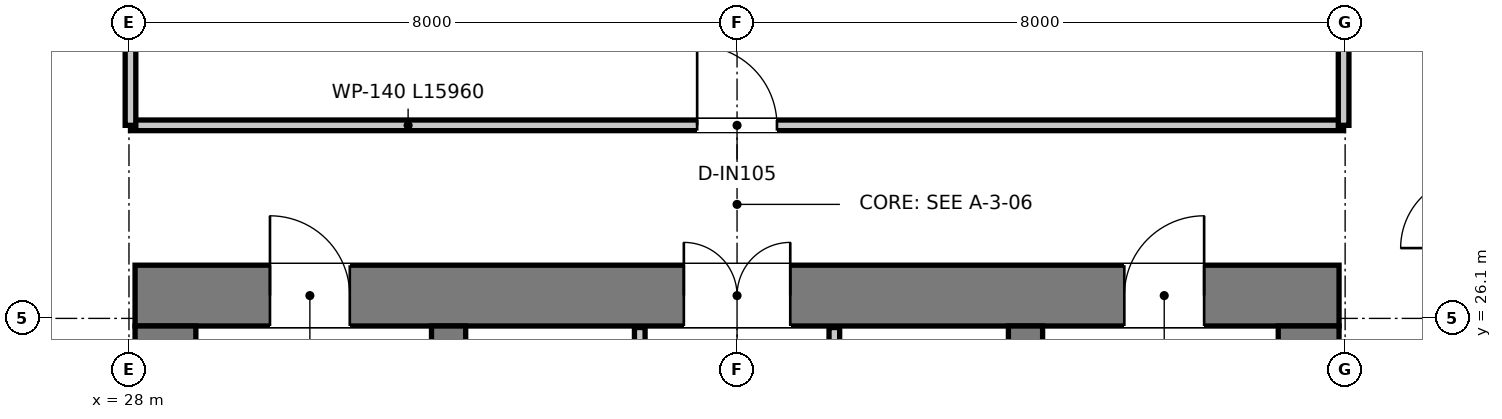
"""IFC4 building model, lengths in metres.
Left out: names, types, materials, properties, quantities, classifications, styles, units other than length and angle.
Written with IfcOpenShell. Run it as: python <this file> out.ifc"""

import sys

from ifc_helpers import new_model, si_unit, direction, frame, frame_2d, origin, place, context, subcontext, project, spatial, rectangle, extrude, element, fill, save


model = new_model("IFC4")
c1 = context("Model", 3, precision=1e-05, world=origin(), true_north=direction((0.0, 1.0)))
c2 = subcontext(c1, "Body", "Model", "MODEL_VIEW")
j1 = project(units=[si_unit("LENGTHUNIT", "METRE"), si_unit("PLANEANGLEUNIT", "RADIAN")], contexts=[c1])
p1 = place(None, origin())
s1 = spatial("IfcSite", under=j1, at=p1, CompositionType="ELEMENT")
p2 = place(p1, origin())
s2 = spatial("IfcBuilding", under=s1, at=p2, CompositionType="ELEMENT")
p3 = place(p2, frame((0.0, 0.0, 121.65)))
s3 = spatial("IfcBuildingStorey", under=s2, at=p3, CompositionType="ELEMENT", Elevation=121.65)
p4 = place(p3, frame((28.08, 26.4, 0.0), z_axis=(0.0, 0.0, 1.0), x_axis=(1.0, 0.0, 0.0)))
e1 = element("IfcWall", 1, at=p4, inside=s3, PredefinedType="SHEAR", context=c2, shape_type="SweptSolid", body=[
    extrude(rectangle(XDim=15.84, YDim=0.8, at=frame_2d((7.92, 0.0))), origin(), (0.0, 0.0, 1.0), 3.95),
])
p5 = place(p4, frame((7.22, 0.0, 0.0)))
e2 = element("IfcOpeningElement", 2, at=p5, cuts=e1, PredefinedType="OPENING", context=c2, shape_type="SweptSolid", body=[
    extrude(rectangle(XDim=1.4, YDim=2.2, at=frame_2d((0.7, 1.1))), frame((0.0, 0.41, 0.0), z_axis=(0.0, -1.0, 0.0), x_axis=(1.0, 0.0, 0.0)), (0.0, 0.0, 1.0), 0.82),
])
p6 = place(p4, frame((1.775, 0.0, 0.0)))
e3 = element("IfcOpeningElement", 3, at=p6, cuts=e1, PredefinedType="OPENING", context=c2, shape_type="SweptSolid", body=[
    extrude(rectangle(XDim=1.05, YDim=2.1, at=frame_2d((0.525, 1.05))), frame((0.0, 0.41, 0.0), z_axis=(0.0, -1.0, 0.0), x_axis=(1.0, 0.0, 0.0)), (0.0, 0.0, 1.0), 0.82),
])
p7 = place(p4, frame((13.015, 0.0, 0.0)))
e4 = element("IfcOpeningElement", 4, at=p7, cuts=e1, PredefinedType="OPENING", context=c2, shape_type="SweptSolid", body=[
    extrude(rectangle(XDim=1.05, YDim=2.1, at=frame_2d((0.525, 1.05))), frame((0.0, 0.41, 0.0), z_axis=(0.0, -1.0, 0.0), x_axis=(1.0, 0.0, 0.0)), (0.0, 0.0, 1.0), 0.82),
])
for number, where, z_axis, x_axis in (
    (5, (28.48, 11.3, 0.0), (0.0, 0.0, 1.0), (0.0, 1.0, 0.0)),
    (6, (43.52, 11.3, 0.0), (0.0, 0.0, 1.0), (0.0, 1.0, 0.0)),
):
    element("IfcWall", number, at=place(p3, frame(where, z_axis=z_axis, x_axis=x_axis)), inside=s3, PredefinedType="SHEAR", context=c2, shape_type="SweptSolid", body=[
        extrude(rectangle(XDim=14.7, YDim=0.8, at=frame_2d((7.35, 0.0))), origin(), (0.0, 0.0, 1.0), 3.95),
    ])
p8 = place(p3, frame((32.205, 13.22, 0.0), z_axis=(0.0, 0.0, 1.0), x_axis=(0.0, 1.0, 0.0)))
e7 = element("IfcWall", 7, at=p8, inside=s3, PredefinedType="SHEAR", context=c2, shape_type="SweptSolid", body=[
    extrude(rectangle(XDim=12.78, YDim=0.45, at=frame_2d((6.39, 0.0))), origin(), (0.0, 0.0, 1.0), 3.95),
])
p9 = place(p8, frame((10.58, 0.0, 0.0)))
e8 = element("IfcOpeningElement", 8, at=p9, cuts=e7, PredefinedType="OPENING", context=c2, shape_type="SweptSolid", body=[
    extrude(rectangle(XDim=1.1, YDim=2.15, at=frame_2d((0.55, 1.075))), frame((0.0, 0.235, 0.0), z_axis=(0.0, -1.0, 0.0), x_axis=(1.0, 0.0, 0.0)), (0.0, 0.0, 1.0), 0.47),
])
p10 = place(p3, frame((39.795, 13.22, 0.0), z_axis=(0.0, 0.0, 1.0), x_axis=(0.0, 1.0, 0.0)))
e9 = element("IfcWall", 9, at=p10, inside=s3, PredefinedType="SHEAR", context=c2, shape_type="SweptSolid", body=[
    extrude(rectangle(XDim=12.78, YDim=0.45, at=frame_2d((6.39, 0.0))), origin(), (0.0, 0.0, 1.0), 3.95),
])
p11 = place(p10, frame((10.58, 0.0, 0.0)))
e10 = element("IfcOpeningElement", 10, at=p11, cuts=e9, PredefinedType="OPENING", context=c2, shape_type="SweptSolid", body=[
    extrude(rectangle(XDim=1.1, YDim=2.15, at=frame_2d((0.55, 1.075))), frame((0.0, 0.235, 0.0), z_axis=(0.0, -1.0, 0.0), x_axis=(1.0, 0.0, 0.0)), (0.0, 0.0, 1.0), 0.47),
])
p12 = place(p3, frame((34.72, 20.2, 0.0), z_axis=(0.0, 0.0, 1.0), x_axis=(0.0, 1.0, 0.0)))
e11 = element("IfcWall", 11, at=p12, inside=s3, PredefinedType="PARTITIONING", context=c2, shape_type="SweptSolid", body=[
    extrude(rectangle(XDim=5.78, YDim=0.14, at=frame_2d((2.89, 0.0))), origin(), (0.0, 0.0, 1.0), 2.67),
])
p13 = place(p12, frame((1.05, 0.0, 0.0)))
e12 = element("IfcOpeningElement", 12, at=p13, cuts=e11, PredefinedType="OPENING", context=c2, shape_type="SweptSolid", body=[
    extrude(rectangle(XDim=0.9, YDim=2.1, at=frame_2d((0.45, 1.05))), frame((0.0, 0.08, 0.0), z_axis=(0.0, -1.0, 0.0), x_axis=(1.0, 0.0, 0.0)), (0.0, 0.0, 1.0), 0.16),
])
p14 = place(p3, frame((37.28, 20.2, 0.0), z_axis=(0.0, 0.0, 1.0), x_axis=(0.0, 1.0, 0.0)))
e13 = element("IfcWall", 13, at=p14, inside=s3, PredefinedType="PARTITIONING", context=c2, shape_type="SweptSolid", body=[
    extrude(rectangle(XDim=5.78, YDim=0.14, at=frame_2d((2.89, 0.0))), origin(), (0.0, 0.0, 1.0), 2.67),
])
p15 = place(p14, frame((0.95, 0.0, 0.0)))
e14 = element("IfcOpeningElement", 14, at=p15, cuts=e13, PredefinedType="OPENING", context=c2, shape_type="SweptSolid", body=[
    extrude(rectangle(XDim=1.1, YDim=2.15, at=frame_2d((0.55, 1.075))), frame((0.0, 0.08, 0.0), z_axis=(0.0, -1.0, 0.0), x_axis=(1.0, 0.0, 0.0)), (0.0, 0.0, 1.0), 0.16),
])
p16 = place(p3, frame((28.02, 28.64, 0.0), z_axis=(0.0, 0.0, 1.0), x_axis=(1.0, 0.0, 0.0)))
e15 = element("IfcWall", 15, at=p16, inside=s3, PredefinedType="PARTITIONING", context=c2, shape_type="SweptSolid", body=[
    extrude(rectangle(XDim=15.96, YDim=0.14, at=frame_2d((7.98, 0.0))), origin(), (0.0, 0.0, 1.0), 3.08),
])
p17 = place(p16, frame((7.455, 0.0, 0.0)))
e16 = element("IfcOpeningElement", 16, at=p17, cuts=e15, PredefinedType="OPENING", context=c2, shape_type="SweptSolid", body=[
    extrude(rectangle(XDim=1.05, YDim=2.15, at=frame_2d((0.525, 1.075))), frame((0.0, 0.08, 0.0), z_axis=(0.0, -1.0, 0.0), x_axis=(1.0, 0.0, 0.0)), (0.0, 0.0, 1.0), 0.16),
])
for number, where, z_axis, x_axis in (
    (17, (28.02, 28.64, 0.0), (0.0, 0.0, 1.0), (0.0, 1.0, 0.0)),
    (18, (43.98, 28.64, 0.0), (0.0, 0.0, 1.0), (0.0, 1.0, 0.0)),
):
    element("IfcWall", number, at=place(p3, frame(where, z_axis=z_axis, x_axis=x_axis)), inside=s3, PredefinedType="PARTITIONING", context=c2, shape_type="SweptSolid", body=[
        extrude(rectangle(XDim=5.74, YDim=0.14, at=frame_2d((2.87, 0.0))), origin(), (0.0, 0.0, 1.0), 3.27),
    ])
p18 = place(p5, origin())
e19 = element("IfcDoor", 19, at=p18, inside=s3, OperationType="DOUBLE_DOOR_SINGLE_SWING", PredefinedType="DOOR", context=c2, shape_type="SweptSolid", body=[
    extrude(rectangle(XDim=1.4, YDim=2.2, at=frame_2d((0.7, 1.1))), frame((0.0, 0.025, 0.0), z_axis=(0.0, -1.0, 0.0), x_axis=(1.0, 0.0, 0.0)), (0.0, 0.0, 1.0), 0.05),
])
fill(e2, e19)
p19 = place(p6, origin())
e20 = element("IfcDoor", 20, at=p19, inside=s3, OperationType="SINGLE_SWING_LEFT", PredefinedType="DOOR", context=c2, shape_type="SweptSolid", body=[
    extrude(rectangle(XDim=1.05, YDim=2.1, at=frame_2d((0.525, 1.05))), frame((0.0, 0.025, 0.0), z_axis=(0.0, -1.0, 0.0), x_axis=(1.0, 0.0, 0.0)), (0.0, 0.0, 1.0), 0.05),
])
fill(e3, e20)
p20 = place(p7, origin())
e21 = element("IfcDoor", 21, at=p20, inside=s3, OperationType="SINGLE_SWING_RIGHT", PredefinedType="DOOR", context=c2, shape_type="SweptSolid", body=[
    extrude(rectangle(XDim=1.05, YDim=2.1, at=frame_2d((0.525, 1.05))), frame((0.0, 0.025, 0.0), z_axis=(0.0, -1.0, 0.0), x_axis=(1.0, 0.0, 0.0)), (0.0, 0.0, 1.0), 0.05),
])
fill(e4, e21)
p21 = place(p17, origin())
e22 = element("IfcDoor", 22, at=p21, inside=s3, OperationType="SINGLE_SWING_LEFT", PredefinedType="DOOR", context=c2, shape_type="SweptSolid", body=[
    extrude(rectangle(XDim=1.05, YDim=2.15, at=frame_2d((0.525, 1.075))), frame((0.0, 0.025, 0.0), z_axis=(0.0, -1.0, 0.0), x_axis=(1.0, 0.0, 0.0)), (0.0, 0.0, 1.0), 0.05),
])
fill(e16, e22)
save(model, sys.argv[1])
